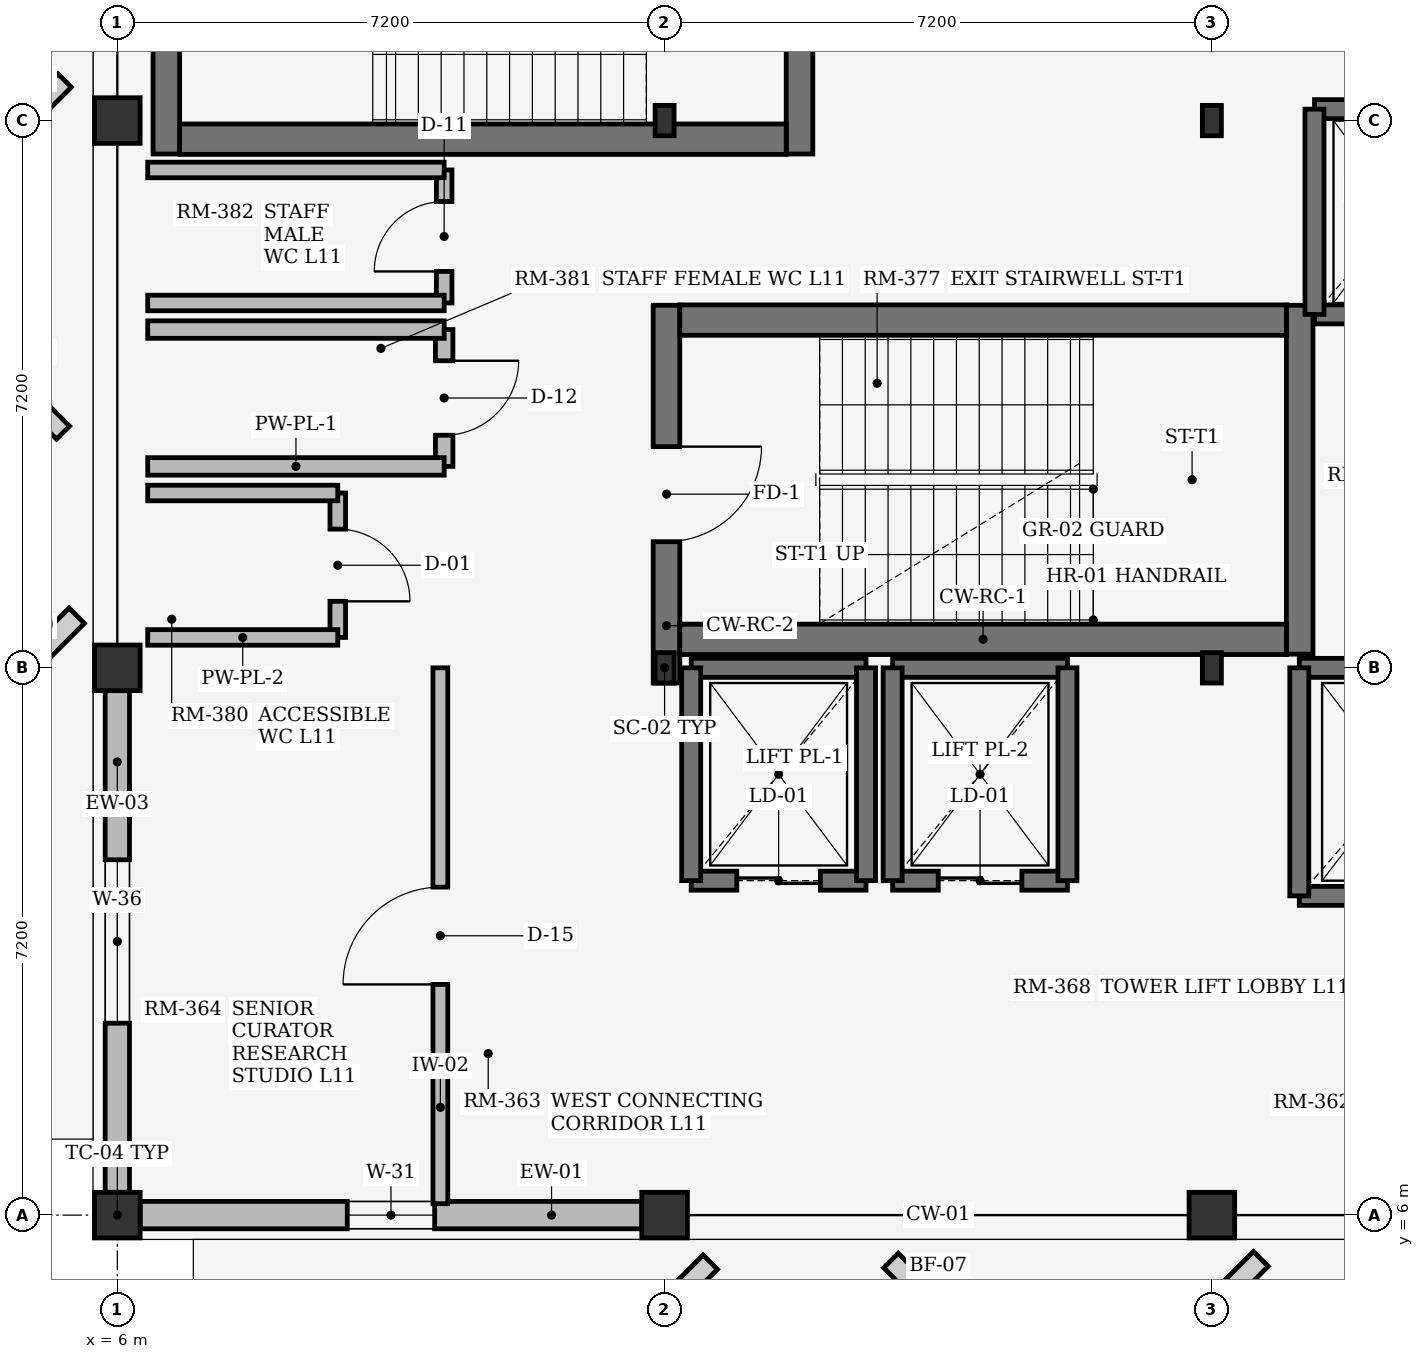
"""IFC4 building model, lengths in metres.
Left out: names, types, materials, properties, quantities, classifications, styles, units other than length and angle.
Written with IfcOpenShell. Run it as: python <this file> out.ifc"""

import sys

from ifc_helpers import new_model, si_unit, direction, frame, frame_2d, origin, origin_2d, place, context, subcontext, project, spatial, rectangle, i_section, extrude, element, fill, save


model = new_model("IFC4")
c1 = context("Model", 3, precision=1e-05, world=origin(), true_north=direction((0.0, 1.0)))
c2 = subcontext(c1, "Body", "Model", "MODEL_VIEW")
j1 = project(units=[si_unit("LENGTHUNIT", "METRE"), si_unit("PLANEANGLEUNIT", "RADIAN")], contexts=[c1])
p1 = place(None, origin())
s1 = spatial("IfcSite", under=j1, at=p1, CompositionType="ELEMENT")
p2 = place(p1, origin())
s2 = spatial("IfcBuilding", under=s1, at=p2, CompositionType="ELEMENT")
p3 = place(p2, frame((0.0, 0.0, 44.4)))
s3 = spatial("IfcBuildingStorey", under=s2, at=p3, CompositionType="ELEMENT", Elevation=44.4)
for number, where, z_axis, x_axis in (
    (1, (6.0, 6.0, 0.0), (0.0, 0.0, 1.0), (1.0, 0.0, 0.0)),
    (2, (6.0, 13.2, 0.0), (0.0, 0.0, 1.0), (1.0, 0.0, 0.0)),
    (3, (6.0, 20.4, 0.0), (0.0, 0.0, 1.0), (1.0, 0.0, 0.0)),
    (4, (13.2, 6.0, 0.0), (0.0, 0.0, 1.0), (1.0, 0.0, 0.0)),
):
    element("IfcColumn", number, at=place(p3, frame(where, z_axis=z_axis, x_axis=x_axis)), inside=s3, PredefinedType="COLUMN", context=c2, shape_type="SweptSolid", body=[
        extrude(rectangle(XDim=0.6, YDim=0.6, at=origin_2d()), origin(), (0.0, 0.0, 1.0), 3.69),
    ])
for number, where, z_axis, x_axis in (
    (5, (13.2, 13.2, 0.0), (0.0, 0.0, 1.0), (1.0, 0.0, 0.0)),
    (6, (13.2, 20.4, 0.0), (0.0, 0.0, 1.0), (1.0, 0.0, 0.0)),
):
    element("IfcColumn", number, at=place(p3, frame(where, z_axis=z_axis, x_axis=x_axis)), inside=s3, PredefinedType="COLUMN", context=c2, shape_type="SweptSolid", body=[
        extrude(i_section(OverallWidth=0.25, OverallDepth=0.4, WebThickness=0.01, FlangeThickness=0.013, at=origin_2d()), origin(), (0.0, 0.0, 1.0), 3.69),
    ])
p4 = place(p3, frame((20.4, 6.0, 0.0), z_axis=(0.0, 0.0, 1.0), x_axis=(1.0, 0.0, 0.0)))
e7 = element("IfcColumn", 7, at=p4, inside=s3, PredefinedType="COLUMN", context=c2, shape_type="SweptSolid", body=[
    extrude(rectangle(XDim=0.6, YDim=0.6, at=origin_2d()), origin(), (0.0, 0.0, 1.0), 3.69),
])
for number, where, z_axis, x_axis in (
    (8, (20.4, 13.2, 0.0), (0.0, 0.0, 1.0), (1.0, 0.0, 0.0)),
    (9, (20.4, 20.4, 0.0), (0.0, 0.0, 1.0), (1.0, 0.0, 0.0)),
):
    element("IfcColumn", number, at=place(p3, frame(where, z_axis=z_axis, x_axis=x_axis)), inside=s3, PredefinedType="COLUMN", context=c2, shape_type="SweptSolid", body=[
        extrude(i_section(OverallWidth=0.25, OverallDepth=0.4, WebThickness=0.01, FlangeThickness=0.013, at=origin_2d()), origin(), (0.0, 0.0, 1.0), 3.69),
    ])
p5 = place(p3, frame((6.3, 6.0, 0.0), z_axis=(0.0, 0.0, 1.0), x_axis=(1.0, 0.0, 0.0)))
e10 = element("IfcWall", 10, at=p5, inside=s3, PredefinedType="STANDARD", context=c2, shape_type="SweptSolid", body=[
    extrude(rectangle(XDim=6.6, YDim=0.36, at=frame_2d((3.3, 0.0))), origin(), (0.0, 0.0, 1.0), 3.17),
])
p6 = place(p5, frame((2.725, 0.0, 0.75)))
e11 = element("IfcOpeningElement", 11, at=p6, cuts=e10, PredefinedType="OPENING", context=c2, shape_type="SweptSolid", body=[
    extrude(rectangle(XDim=1.15, YDim=1.35, at=frame_2d((0.575, 0.675))), frame((0.0, 0.19, 0.0), z_axis=(0.0, -1.0, 0.0), x_axis=(1.0, 0.0, 0.0)), (0.0, 0.0, 1.0), 0.38),
])
p7 = place(p3, frame((6.0, 6.3, 0.0), z_axis=(0.0, 0.0, 1.0), x_axis=(0.0, 1.0, 0.0)))
e12 = element("IfcWall", 12, at=p7, inside=s3, PredefinedType="STANDARD", context=c2, shape_type="SweptSolid", body=[
    extrude(rectangle(XDim=6.6, YDim=0.32, at=frame_2d((3.3, 0.0))), origin(), (0.0, 0.0, 1.0), 3.17),
])
p8 = place(p7, frame((2.225, 0.0, 0.75)))
e13 = element("IfcOpeningElement", 13, at=p8, cuts=e12, PredefinedType="OPENING", context=c2, shape_type="SweptSolid", body=[
    extrude(rectangle(XDim=2.15, YDim=1.35, at=frame_2d((1.075, 0.675))), frame((0.0, 0.17, 0.0), z_axis=(0.0, -1.0, 0.0), x_axis=(1.0, 0.0, 0.0)), (0.0, 0.0, 1.0), 0.34),
])
p9 = place(p3, frame((13.225, 13.0, 0.0), z_axis=(0.0, 0.0, 1.0), x_axis=(0.0, 1.0, 0.0)))
e14 = element("IfcWall", 14, at=p9, inside=s3, PredefinedType="SHEAR", context=c2, shape_type="SweptSolid", body=[
    extrude(rectangle(XDim=4.97, YDim=0.35, at=frame_2d((2.485, 0.0))), origin(), (0.0, 0.0, 1.0), 3.69),
])
p10 = place(p9, frame((1.86, 0.0, 0.0)))
e15 = element("IfcOpeningElement", 15, at=p10, cuts=e14, PredefinedType="OPENING", context=c2, shape_type="SweptSolid", body=[
    extrude(rectangle(XDim=1.25, YDim=2.2, at=frame_2d((0.625, 1.1))), frame((0.0, 0.185, 0.0), z_axis=(0.0, -1.0, 0.0), x_axis=(1.0, 0.0, 0.0)), (0.0, 0.0, 1.0), 0.37),
])
p11 = place(p3, frame((21.555, 13.38, 0.0), z_axis=(0.0, 0.0, 1.0), x_axis=(0.0, 1.0, 0.0)))
e16 = element("IfcWall", 16, at=p11, inside=s3, PredefinedType="SHEAR", context=c2, shape_type="SweptSolid", body=[
    extrude(rectangle(XDim=4.59, YDim=0.35, at=frame_2d((2.295, 0.0))), origin(), (0.0, 0.0, 1.0), 3.69),
])
for number, where, z_axis, x_axis in (
    (17, (13.4, 13.575, 0.0), (0.0, 0.0, 1.0), (1.0, 0.0, 0.0)),
    (18, (13.4, 17.775, 0.0), (0.0, 0.0, 1.0), (1.0, 0.0, 0.0)),
):
    element("IfcWall", number, at=place(p3, frame(where, z_axis=z_axis, x_axis=x_axis)), inside=s3, PredefinedType="SHEAR", context=c2, shape_type="SweptSolid", body=[
        extrude(rectangle(XDim=7.98, YDim=0.4, at=frame_2d((3.99, 0.0))), origin(), (0.0, 0.0, 1.0), 3.69),
    ])
p12 = place(p3, frame((14.975, 24.55, 0.0), z_axis=(0.0, 0.0, 1.0), x_axis=(0.0, -1.0, 0.0)))
e19 = element("IfcWall", 19, at=p12, inside=s3, PredefinedType="SHEAR", context=c2, shape_type="SweptSolid", body=[
    extrude(rectangle(XDim=4.59, YDim=0.35, at=frame_2d((2.295, 0.0))), origin(), (0.0, 0.0, 1.0), 3.69),
])
p13 = place(p12, frame((1.72, 0.0, 0.0)))
e20 = element("IfcOpeningElement", 20, at=p13, cuts=e19, PredefinedType="OPENING", context=c2, shape_type="SweptSolid", body=[
    extrude(rectangle(XDim=1.15, YDim=2.2, at=frame_2d((0.575, 1.1))), frame((0.0, 0.185, 0.0), z_axis=(0.0, -1.0, 0.0), x_axis=(1.0, 0.0, 0.0)), (0.0, 0.0, 1.0), 0.37),
])
p14 = place(p3, frame((6.645, 24.55, 0.0), z_axis=(0.0, 0.0, 1.0), x_axis=(0.0, -1.0, 0.0)))
e21 = element("IfcWall", 21, at=p14, inside=s3, PredefinedType="SHEAR", context=c2, shape_type="SweptSolid", body=[
    extrude(rectangle(XDim=4.59, YDim=0.35, at=frame_2d((2.295, 0.0))), origin(), (0.0, 0.0, 1.0), 3.69),
])
p15 = place(p3, frame((14.8, 20.155, 0.0), z_axis=(0.0, 0.0, 1.0), x_axis=(-1.0, 0.0, 0.0)))
e22 = element("IfcWall", 22, at=p15, inside=s3, PredefinedType="SHEAR", context=c2, shape_type="SweptSolid", body=[
    extrude(rectangle(XDim=7.98, YDim=0.4, at=frame_2d((3.99, 0.0))), origin(), (0.0, 0.0, 1.0), 3.69),
])
p16 = place(p3, frame((21.75, 17.85, 0.0), z_axis=(0.0, 0.0, 1.0), x_axis=(1.0, 0.0, 0.0)))
e23 = element("IfcWall", 23, at=p16, inside=s3, PredefinedType="SHEAR", context=c2, shape_type="SweptSolid", body=[
    extrude(rectangle(XDim=2.3, YDim=0.25, at=frame_2d((1.15, 0.0))), origin(), (0.0, 0.0, 1.0), 3.69),
])
p17 = place(p16, frame((0.6, 0.0, 0.0)))
e24 = element("IfcOpeningElement", 24, at=p17, cuts=e23, PredefinedType="OPENING", context=c2, shape_type="SweptSolid", body=[
    extrude(rectangle(XDim=1.1, YDim=2.2, at=frame_2d((0.55, 1.1))), frame((0.0, 0.135, 0.0), z_axis=(0.0, -1.0, 0.0), x_axis=(1.0, 0.0, 0.0)), (0.0, 0.0, 1.0), 0.27),
])
p18 = place(p3, frame((21.75, 20.55, 0.0), z_axis=(0.0, 0.0, 1.0), x_axis=(1.0, 0.0, 0.0)))
e25 = element("IfcWall", 25, at=p18, inside=s3, PredefinedType="SHEAR", context=c2, shape_type="SweptSolid", body=[
    extrude(rectangle(XDim=2.3, YDim=0.25, at=frame_2d((1.15, 0.0))), origin(), (0.0, 0.0, 1.0), 3.69),
])
p19 = place(p3, frame((21.75, 17.85, 0.0), z_axis=(0.0, 0.0, 1.0), x_axis=(0.0, 1.0, 0.0)))
e26 = element("IfcWall", 26, at=p19, inside=s3, PredefinedType="SHEAR", context=c2, shape_type="SweptSolid", body=[
    extrude(rectangle(XDim=2.7, YDim=0.25, at=frame_2d((1.35, 0.0))), origin(), (0.0, 0.0, 1.0), 3.69),
])
p20 = place(p3, frame((13.55, 10.4, 0.0), z_axis=(0.0, 0.0, 1.0), x_axis=(1.0, 0.0, 0.0)))
e27 = element("IfcWall", 27, at=p20, inside=s3, PredefinedType="SHEAR", context=c2, shape_type="SweptSolid", body=[
    extrude(rectangle(XDim=2.3, YDim=0.25, at=frame_2d((1.15, 0.0))), origin(), (0.0, 0.0, 1.0), 3.69),
])
p21 = place(p20, frame((0.6, 0.0, 0.0)))
e28 = element("IfcOpeningElement", 28, at=p21, cuts=e27, PredefinedType="OPENING", context=c2, shape_type="SweptSolid", body=[
    extrude(rectangle(XDim=1.1, YDim=2.2, at=frame_2d((0.55, 1.1))), frame((0.0, 0.135, 0.0), z_axis=(0.0, -1.0, 0.0), x_axis=(1.0, 0.0, 0.0)), (0.0, 0.0, 1.0), 0.27),
])
p22 = place(p3, frame((13.55, 13.2, 0.0), z_axis=(0.0, 0.0, 1.0), x_axis=(1.0, 0.0, 0.0)))
e29 = element("IfcWall", 29, at=p22, inside=s3, PredefinedType="SHEAR", context=c2, shape_type="SweptSolid", body=[
    extrude(rectangle(XDim=2.3, YDim=0.25, at=frame_2d((1.15, 0.0))), origin(), (0.0, 0.0, 1.0), 3.69),
])
for number, where, z_axis, x_axis in (
    (30, (13.55, 10.4, 0.0), (0.0, 0.0, 1.0), (0.0, 1.0, 0.0)),
    (31, (15.85, 10.4, 0.0), (0.0, 0.0, 1.0), (0.0, 1.0, 0.0)),
):
    element("IfcWall", number, at=place(p3, frame(where, z_axis=z_axis, x_axis=x_axis)), inside=s3, PredefinedType="SHEAR", context=c2, shape_type="SweptSolid", body=[
        extrude(rectangle(XDim=2.8, YDim=0.25, at=frame_2d((1.4, 0.0))), origin(), (0.0, 0.0, 1.0), 3.69),
    ])
p23 = place(p3, frame((16.2, 10.4, 0.0), z_axis=(0.0, 0.0, 1.0), x_axis=(1.0, 0.0, 0.0)))
e32 = element("IfcWall", 32, at=p23, inside=s3, PredefinedType="SHEAR", context=c2, shape_type="SweptSolid", body=[
    extrude(rectangle(XDim=2.3, YDim=0.25, at=frame_2d((1.15, 0.0))), origin(), (0.0, 0.0, 1.0), 3.69),
])
p24 = place(p23, frame((0.6, 0.0, 0.0)))
e33 = element("IfcOpeningElement", 33, at=p24, cuts=e32, PredefinedType="OPENING", context=c2, shape_type="SweptSolid", body=[
    extrude(rectangle(XDim=1.1, YDim=2.2, at=frame_2d((0.55, 1.1))), frame((0.0, 0.135, 0.0), z_axis=(0.0, -1.0, 0.0), x_axis=(1.0, 0.0, 0.0)), (0.0, 0.0, 1.0), 0.27),
])
p25 = place(p3, frame((16.2, 13.2, 0.0), z_axis=(0.0, 0.0, 1.0), x_axis=(1.0, 0.0, 0.0)))
e34 = element("IfcWall", 34, at=p25, inside=s3, PredefinedType="SHEAR", context=c2, shape_type="SweptSolid", body=[
    extrude(rectangle(XDim=2.3, YDim=0.25, at=frame_2d((1.15, 0.0))), origin(), (0.0, 0.0, 1.0), 3.69),
])
for number, where, z_axis, x_axis in (
    (35, (16.2, 10.4, 0.0), (0.0, 0.0, 1.0), (0.0, 1.0, 0.0)),
    (36, (18.5, 10.4, 0.0), (0.0, 0.0, 1.0), (0.0, 1.0, 0.0)),
):
    element("IfcWall", number, at=place(p3, frame(where, z_axis=z_axis, x_axis=x_axis)), inside=s3, PredefinedType="SHEAR", context=c2, shape_type="SweptSolid", body=[
        extrude(rectangle(XDim=2.8, YDim=0.25, at=frame_2d((1.4, 0.0))), origin(), (0.0, 0.0, 1.0), 3.69),
    ])
p26 = place(p3, frame((21.55, 10.2, 0.0), z_axis=(0.0, 0.0, 1.0), x_axis=(1.0, 0.0, 0.0)))
e37 = element("IfcWall", 37, at=p26, inside=s3, PredefinedType="SHEAR", context=c2, shape_type="SweptSolid", body=[
    extrude(rectangle(XDim=2.6, YDim=0.25, at=frame_2d((1.3, 0.0))), origin(), (0.0, 0.0, 1.0), 3.69),
])
p27 = place(p26, frame((0.65, 0.0, 0.0)))
e38 = element("IfcOpeningElement", 38, at=p27, cuts=e37, PredefinedType="OPENING", context=c2, shape_type="SweptSolid", body=[
    extrude(rectangle(XDim=1.3, YDim=2.25, at=frame_2d((0.65, 1.125))), frame((0.0, 0.135, 0.0), z_axis=(0.0, -1.0, 0.0), x_axis=(1.0, 0.0, 0.0)), (0.0, 0.0, 1.0), 0.27),
])
p28 = place(p3, frame((21.55, 13.2, 0.0), z_axis=(0.0, 0.0, 1.0), x_axis=(1.0, 0.0, 0.0)))
e39 = element("IfcWall", 39, at=p28, inside=s3, PredefinedType="SHEAR", context=c2, shape_type="SweptSolid", body=[
    extrude(rectangle(XDim=2.6, YDim=0.25, at=frame_2d((1.3, 0.0))), origin(), (0.0, 0.0, 1.0), 3.69),
])
p29 = place(p3, frame((21.55, 10.2, 0.0), z_axis=(0.0, 0.0, 1.0), x_axis=(0.0, 1.0, 0.0)))
e40 = element("IfcWall", 40, at=p29, inside=s3, PredefinedType="SHEAR", context=c2, shape_type="SweptSolid", body=[
    extrude(rectangle(XDim=3.0, YDim=0.25, at=frame_2d((1.5, 0.0))), origin(), (0.0, 0.0, 1.0), 3.69),
])
p30 = place(p3, frame((8.9, 13.6, 0.0), z_axis=(0.0, 0.0, 1.0), x_axis=(0.0, 1.0, 0.0)))
e41 = element("IfcWall", 41, at=p30, inside=s3, PredefinedType="PLUMBINGWALL", context=c2, shape_type="SweptSolid", body=[
    extrude(rectangle(XDim=1.9, YDim=0.205, at=frame_2d((0.95, 0.0))), origin(), (0.0, 0.0, 1.0), 3.67),
])
p31 = place(p30, frame((0.475, 0.0, 0.0)))
e42 = element("IfcOpeningElement", 42, at=p31, cuts=e41, PredefinedType="OPENING", context=c2, shape_type="SweptSolid", body=[
    extrude(rectangle(XDim=0.95, YDim=2.15, at=frame_2d((0.475, 1.075))), frame((0.0, 0.113, 0.0), z_axis=(0.0, -1.0, 0.0), x_axis=(1.0, 0.0, 0.0)), (0.0, 0.0, 1.0), 0.225),
])
for number, where, z_axis, x_axis in (
    (43, (6.4, 13.6, 0.0), (0.0, 0.0, 1.0), (1.0, 0.0, 0.0)),
    (44, (6.4, 15.5, 0.0), (0.0, 0.0, 1.0), (1.0, 0.0, 0.0)),
):
    element("IfcWall", number, at=place(p3, frame(where, z_axis=z_axis, x_axis=x_axis)), inside=s3, PredefinedType="PLUMBINGWALL", context=c2, shape_type="SweptSolid", body=[
        extrude(rectangle(XDim=2.5, YDim=0.205, at=frame_2d((1.25, 0.0))), origin(), (0.0, 0.0, 1.0), 3.67),
    ])
p32 = place(p3, frame((10.3, 15.85, 0.0), z_axis=(0.0, 0.0, 1.0), x_axis=(0.0, 1.0, 0.0)))
e45 = element("IfcWall", 45, at=p32, inside=s3, PredefinedType="PLUMBINGWALL", context=c2, shape_type="SweptSolid", body=[
    extrude(rectangle(XDim=1.8, YDim=0.23, at=frame_2d((0.9, 0.0))), origin(), (0.0, 0.0, 1.0), 3.67),
])
p33 = place(p32, frame((0.41, 0.0, 0.0)))
e46 = element("IfcOpeningElement", 46, at=p33, cuts=e45, PredefinedType="OPENING", context=c2, shape_type="SweptSolid", body=[
    extrude(rectangle(XDim=0.98, YDim=2.1, at=frame_2d((0.49, 1.05))), frame((0.0, 0.125, 0.0), z_axis=(0.0, -1.0, 0.0), x_axis=(1.0, 0.0, 0.0)), (0.0, 0.0, 1.0), 0.25),
])
for number, where, z_axis, x_axis in (
    (47, (6.4, 15.85, 0.0), (0.0, 0.0, 1.0), (1.0, 0.0, 0.0)),
    (48, (6.4, 17.65, 0.0), (0.0, 0.0, 1.0), (1.0, 0.0, 0.0)),
):
    element("IfcWall", number, at=place(p3, frame(where, z_axis=z_axis, x_axis=x_axis)), inside=s3, PredefinedType="PLUMBINGWALL", context=c2, shape_type="SweptSolid", body=[
        extrude(rectangle(XDim=3.9, YDim=0.23, at=frame_2d((1.95, 0.0))), origin(), (0.0, 0.0, 1.0), 3.67),
    ])
p34 = place(p3, frame((10.3, 18.0, 0.0), z_axis=(0.0, 0.0, 1.0), x_axis=(0.0, 1.0, 0.0)))
e49 = element("IfcWall", 49, at=p34, inside=s3, PredefinedType="PLUMBINGWALL", context=c2, shape_type="SweptSolid", body=[
    extrude(rectangle(XDim=1.75, YDim=0.205, at=frame_2d((0.875, 0.0))), origin(), (0.0, 0.0, 1.0), 3.67),
])
p35 = place(p34, frame((0.415, 0.0, 0.0)))
e50 = element("IfcOpeningElement", 50, at=p35, cuts=e49, PredefinedType="OPENING", context=c2, shape_type="SweptSolid", body=[
    extrude(rectangle(XDim=0.92, YDim=2.1, at=frame_2d((0.46, 1.05))), frame((0.0, 0.113, 0.0), z_axis=(0.0, -1.0, 0.0), x_axis=(1.0, 0.0, 0.0)), (0.0, 0.0, 1.0), 0.225),
])
for number, where, z_axis, x_axis in (
    (51, (6.4, 18.0, 0.0), (0.0, 0.0, 1.0), (1.0, 0.0, 0.0)),
    (52, (6.4, 19.75, 0.0), (0.0, 0.0, 1.0), (1.0, 0.0, 0.0)),
):
    element("IfcWall", number, at=place(p3, frame(where, z_axis=z_axis, x_axis=x_axis)), inside=s3, PredefinedType="PLUMBINGWALL", context=c2, shape_type="SweptSolid", body=[
        extrude(rectangle(XDim=3.9, YDim=0.205, at=frame_2d((1.95, 0.0))), origin(), (0.0, 0.0, 1.0), 3.67),
    ])
p36 = place(p3, frame((10.25, 6.15, 0.0), z_axis=(0.0, 0.0, 1.0), x_axis=(0.0, 1.0, 0.0)))
e53 = element("IfcWall", 53, at=p36, inside=s3, PredefinedType="PARTITIONING", context=c2, shape_type="SweptSolid", body=[
    extrude(rectangle(XDim=7.05, YDim=0.195, at=frame_2d((3.525, 0.0))), origin(), (0.0, 0.0, 1.0), 3.67),
])
p37 = place(p36, frame((2.885, 0.0, 0.0)))
e54 = element("IfcOpeningElement", 54, at=p37, cuts=e53, PredefinedType="OPENING", context=c2, shape_type="SweptSolid", body=[
    extrude(rectangle(XDim=1.28, YDim=2.15, at=frame_2d((0.64, 1.075))), frame((0.0, 0.107, 0.0), z_axis=(0.0, -1.0, 0.0), x_axis=(1.0, 0.0, 0.0)), (0.0, 0.0, 1.0), 0.215),
])
p38 = place(p6, origin())
e55 = element("IfcWindow", 55, at=p38, inside=s3, PartitioningType="SINGLE_PANEL", PredefinedType="WINDOW", context=c2, shape_type="SweptSolid", body=[
    extrude(rectangle(XDim=1.15, YDim=1.35, at=frame_2d((0.575, 0.675))), frame((0.0, 0.03, 0.0), z_axis=(0.0, -1.0, 0.0), x_axis=(1.0, 0.0, 0.0)), (0.0, 0.0, 1.0), 0.06),
])
fill(e11, e55)
p39 = place(p8, origin())
e56 = element("IfcWindow", 56, at=p39, inside=s3, PartitioningType="SINGLE_PANEL", PredefinedType="WINDOW", context=c2, shape_type="SweptSolid", body=[
    extrude(rectangle(XDim=2.15, YDim=1.35, at=frame_2d((1.075, 0.675))), frame((0.0, 0.03, 0.0), z_axis=(0.0, -1.0, 0.0), x_axis=(1.0, 0.0, 0.0)), (0.0, 0.0, 1.0), 0.06),
])
fill(e13, e56)
p40 = place(p10, origin())
e57 = element("IfcDoor", 57, at=p40, inside=s3, OperationType="SINGLE_SWING_RIGHT", PredefinedType="DOOR", context=c2, shape_type="SweptSolid", body=[
    extrude(rectangle(XDim=1.25, YDim=2.2, at=frame_2d((0.625, 1.1))), frame((0.0, 0.025, 0.0), z_axis=(0.0, -1.0, 0.0), x_axis=(1.0, 0.0, 0.0)), (0.0, 0.0, 1.0), 0.05),
])
fill(e15, e57)
p41 = place(p21, origin())
e58 = element("IfcDoor", 58, at=p41, inside=s3, OperationType="DOUBLE_DOOR_SLIDING", PredefinedType="DOOR", context=c2, shape_type="SweptSolid", body=[
    extrude(rectangle(XDim=1.1, YDim=2.2, at=frame_2d((0.55, 1.1))), frame((0.0, 0.025, 0.0), z_axis=(0.0, -1.0, 0.0), x_axis=(1.0, 0.0, 0.0)), (0.0, 0.0, 1.0), 0.05),
])
fill(e28, e58)
p42 = place(p24, origin())
e59 = element("IfcDoor", 59, at=p42, inside=s3, OperationType="DOUBLE_DOOR_SLIDING", PredefinedType="DOOR", context=c2, shape_type="SweptSolid", body=[
    extrude(rectangle(XDim=1.1, YDim=2.2, at=frame_2d((0.55, 1.1))), frame((0.0, 0.025, 0.0), z_axis=(0.0, -1.0, 0.0), x_axis=(1.0, 0.0, 0.0)), (0.0, 0.0, 1.0), 0.05),
])
fill(e33, e59)
p43 = place(p31, frame((0.95, 0.0, 0.0), z_axis=(0.0, 0.0, 1.0), x_axis=(-1.0, 0.0, 0.0)))
e60 = element("IfcDoor", 60, at=p43, inside=s3, OperationType="SINGLE_SWING_LEFT", PredefinedType="DOOR", context=c2, shape_type="SweptSolid", body=[
    extrude(rectangle(XDim=0.95, YDim=2.15, at=frame_2d((0.475, 1.075))), frame((0.0, 0.025, 0.0), z_axis=(0.0, -1.0, 0.0), x_axis=(1.0, 0.0, 0.0)), (0.0, 0.0, 1.0), 0.05),
])
fill(e42, e60)
p44 = place(p33, origin())
e61 = element("IfcDoor", 61, at=p44, inside=s3, OperationType="SINGLE_SWING_RIGHT", PredefinedType="DOOR", context=c2, shape_type="SweptSolid", body=[
    extrude(rectangle(XDim=0.98, YDim=2.1, at=frame_2d((0.49, 1.05))), frame((0.0, 0.025, 0.0), z_axis=(0.0, -1.0, 0.0), x_axis=(1.0, 0.0, 0.0)), (0.0, 0.0, 1.0), 0.05),
])
fill(e46, e61)
p45 = place(p35, origin())
e62 = element("IfcDoor", 62, at=p45, inside=s3, OperationType="SINGLE_SWING_LEFT", PredefinedType="DOOR", context=c2, shape_type="SweptSolid", body=[
    extrude(rectangle(XDim=0.92, YDim=2.1, at=frame_2d((0.46, 1.05))), frame((0.0, 0.025, 0.0), z_axis=(0.0, -1.0, 0.0), x_axis=(1.0, 0.0, 0.0)), (0.0, 0.0, 1.0), 0.05),
])
fill(e50, e62)
p46 = place(p37, origin())
e63 = element("IfcDoor", 63, at=p46, inside=s3, OperationType="SINGLE_SWING_LEFT", PredefinedType="DOOR", context=c2, shape_type="SweptSolid", body=[
    extrude(rectangle(XDim=1.28, YDim=2.15, at=frame_2d((0.64, 1.075))), frame((0.0, 0.025, 0.0), z_axis=(0.0, -1.0, 0.0), x_axis=(1.0, 0.0, 0.0)), (0.0, 0.0, 1.0), 0.05),
])
fill(e54, e63)
save(model, sys.argv[1])
